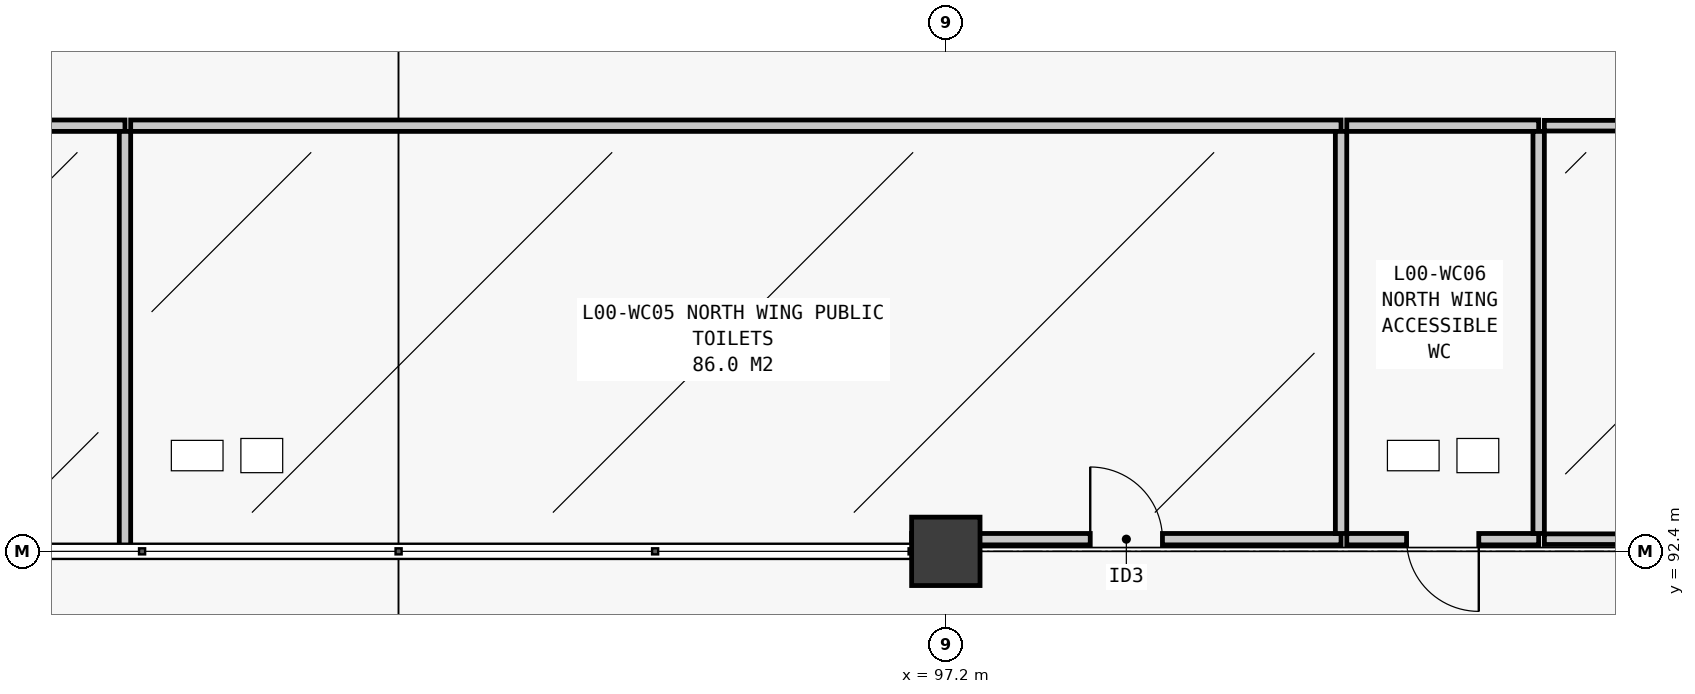
"""IFC4 building model, lengths in metres.
Left out: names, types, materials, properties, quantities, classifications, styles, units other than length and angle.
Written with IfcOpenShell. Run it as: python <this file> out.ifc"""

import sys

from ifc_helpers import new_model, si_unit, direction, frame, frame_2d, origin, origin_2d, place, context, subcontext, project, spatial, rectangle, extrude, element, fill, save


model = new_model("IFC4")
c1 = context("Model", 3, precision=1e-05, world=origin(), true_north=direction((0.0, 1.0)))
c2 = subcontext(c1, "Body", "Model", "MODEL_VIEW")
j1 = project(units=[si_unit("LENGTHUNIT", "METRE"), si_unit("PLANEANGLEUNIT", "RADIAN")], contexts=[c1])
p1 = place(None, origin())
s1 = spatial("IfcSite", under=j1, at=p1, CompositionType="ELEMENT")
p2 = place(p1, origin())
s2 = spatial("IfcBuilding", under=s1, at=p2, CompositionType="ELEMENT")
p3 = place(p2, origin())
s3 = spatial("IfcBuildingStorey", under=s2, at=p3, CompositionType="ELEMENT", Elevation=0.0)
p4 = place(p3, frame((97.2, 92.4, 0.0), z_axis=(0.0, 0.0, 1.0), x_axis=(1.0, 0.0, 0.0)))
e1 = element("IfcColumn", 1, at=p4, inside=s3, PredefinedType="COLUMN", context=c2, shape_type="SweptSolid", body=[
    extrude(rectangle(XDim=0.9, YDim=0.9, at=origin_2d()), origin(), (0.0, 0.0, 1.0), 4.8),
])
p5 = place(p3, frame((51.4, 98.0, 0.0), z_axis=(0.0, 0.0, 1.0), x_axis=(1.0, 0.0, 0.0)))
e2 = element("IfcWall", 2, at=p5, inside=s3, PredefinedType="PLUMBINGWALL", context=c2, shape_type="SweptSolid", body=[
    extrude(rectangle(XDim=35.0, YDim=0.15, at=frame_2d((17.5, 0.0))), origin(), (0.0, 0.0, 1.0), 4.52),
])
p6 = place(p3, frame((86.4, 92.42, 0.0), z_axis=(0.0, 0.0, 1.0), x_axis=(0.0, 1.0, 0.0)))
e3 = element("IfcWall", 3, at=p6, inside=s3, PredefinedType="PLUMBINGWALL", context=c2, shape_type="SweptSolid", body=[
    extrude(rectangle(XDim=5.505, YDim=0.15, at=frame_2d((2.752, 0.0))), origin(), (0.0, 0.0, 1.0), 4.216),
])
p7 = place(p3, frame((96.75, 92.56, 0.0), z_axis=(0.0, 0.0, 1.0), x_axis=(1.0, 0.0, 0.0)))
e4 = element("IfcWall", 4, at=p7, inside=s3, PredefinedType="PLUMBINGWALL", context=c2, shape_type="SweptSolid", body=[
    extrude(rectangle(XDim=5.65, YDim=0.15, at=frame_2d((2.825, 0.0))), origin(), (0.0, 0.0, 1.0), 3.606),
])
p8 = place(p7, frame((2.35, 0.0, 0.0)))
e5 = element("IfcOpeningElement", 5, at=p8, cuts=e4, PredefinedType="OPENING", context=c2, shape_type="SweptSolid", body=[
    extrude(rectangle(XDim=0.95, YDim=2.1, at=frame_2d((0.475, 1.05))), frame((0.0, 0.09, 0.0), z_axis=(0.0, -1.0, 0.0), x_axis=(1.0, 0.0, 0.0)), (0.0, 0.0, 1.0), 0.18),
])
p9 = place(p3, frame((86.475, 98.0, 0.0), z_axis=(0.0, 0.0, 1.0), x_axis=(1.0, 0.0, 0.0)))
e6 = element("IfcWall", 6, at=p9, inside=s3, PredefinedType="PLUMBINGWALL", context=c2, shape_type="SweptSolid", body=[
    extrude(rectangle(XDim=15.925, YDim=0.15, at=frame_2d((7.962, 0.0))), origin(), (0.0, 0.0, 1.0), 4.52),
])
p10 = place(p3, frame((102.4, 92.635, 0.0), z_axis=(0.0, 0.0, 1.0), x_axis=(0.0, 1.0, 0.0)))
e7 = element("IfcWall", 7, at=p10, inside=s3, PredefinedType="PLUMBINGWALL", context=c2, shape_type="SweptSolid", body=[
    extrude(rectangle(XDim=5.29, YDim=0.15, at=frame_2d((2.645, 0.0))), origin(), (0.0, 0.0, 1.0), 4.52),
])
p11 = place(p3, frame((102.475, 92.56, 0.0), z_axis=(0.0, 0.0, 1.0), x_axis=(1.0, 0.0, 0.0)))
e8 = element("IfcWall", 8, at=p11, inside=s3, PredefinedType="PLUMBINGWALL", context=c2, shape_type="SweptSolid", body=[
    extrude(rectangle(XDim=2.525, YDim=0.15, at=frame_2d((1.262, 0.0))), origin(), (0.0, 0.0, 1.0), 3.606),
])
p12 = place(p11, frame((0.787, 0.0, 0.0)))
e9 = element("IfcOpeningElement", 9, at=p12, cuts=e8, PredefinedType="OPENING", context=c2, shape_type="SweptSolid", body=[
    extrude(rectangle(XDim=0.95, YDim=2.1, at=frame_2d((0.475, 1.05))), frame((0.0, 0.09, 0.0), z_axis=(0.0, -1.0, 0.0), x_axis=(1.0, 0.0, 0.0)), (0.0, 0.0, 1.0), 0.18),
])
p13 = place(p3, frame((102.475, 98.0, 0.0), z_axis=(0.0, 0.0, 1.0), x_axis=(1.0, 0.0, 0.0)))
e10 = element("IfcWall", 10, at=p13, inside=s3, PredefinedType="PLUMBINGWALL", context=c2, shape_type="SweptSolid", body=[
    extrude(rectangle(XDim=2.525, YDim=0.15, at=frame_2d((1.262, 0.0))), origin(), (0.0, 0.0, 1.0), 4.52),
])
p14 = place(p3, frame((105.0, 92.635, 0.0), z_axis=(0.0, 0.0, 1.0), x_axis=(0.0, 1.0, 0.0)))
e11 = element("IfcWall", 11, at=p14, inside=s3, PredefinedType="PLUMBINGWALL", context=c2, shape_type="SweptSolid", body=[
    extrude(rectangle(XDim=5.29, YDim=0.15, at=frame_2d((2.645, 0.0))), origin(), (0.0, 0.0, 1.0), 4.52),
])
p15 = place(p3, frame((105.075, 92.56, 0.0), z_axis=(0.0, 0.0, 1.0), x_axis=(1.0, 0.0, 0.0)))
e12 = element("IfcWall", 12, at=p15, inside=s3, PredefinedType="PARTITIONING", context=c2, shape_type="SweptSolid", body=[
    extrude(rectangle(XDim=20.765, YDim=0.14, at=frame_2d((10.383, 0.0))), origin(), (0.0, 0.0, 1.0), 3.606),
])
p16 = place(p15, frame((9.907, 0.0, 0.0)))
e13 = element("IfcOpeningElement", 13, at=p16, cuts=e12, PredefinedType="OPENING", context=c2, shape_type="SweptSolid", body=[
    extrude(rectangle(XDim=0.95, YDim=2.15, at=frame_2d((0.475, 1.075))), frame((0.0, 0.085, 0.0), z_axis=(0.0, -1.0, 0.0), x_axis=(1.0, 0.0, 0.0)), (0.0, 0.0, 1.0), 0.17),
])
p17 = place(p3, frame((105.075, 98.0, 0.0), z_axis=(0.0, 0.0, 1.0), x_axis=(1.0, 0.0, 0.0)))
e14 = element("IfcWall", 14, at=p17, inside=s3, PredefinedType="PARTITIONING", context=c2, shape_type="SweptSolid", body=[
    extrude(rectangle(XDim=20.765, YDim=0.14, at=frame_2d((10.383, 0.0))), origin(), (0.0, 0.0, 1.0), 4.52),
])
p18 = place(p8, origin())
e15 = element("IfcDoor", 15, at=p18, inside=s3, OperationType="SINGLE_SWING_LEFT", PredefinedType="DOOR", context=c2, shape_type="SweptSolid", body=[
    extrude(rectangle(XDim=0.95, YDim=2.1, at=frame_2d((0.475, 1.05))), frame((0.0, 0.025, 0.0), z_axis=(0.0, -1.0, 0.0), x_axis=(1.0, 0.0, 0.0)), (0.0, 0.0, 1.0), 0.05),
])
fill(e5, e15)
p19 = place(p12, frame((0.95, 0.0, 0.0), z_axis=(0.0, 0.0, 1.0), x_axis=(-1.0, 0.0, 0.0)))
e16 = element("IfcDoor", 16, at=p19, inside=s3, OperationType="SINGLE_SWING_RIGHT", PredefinedType="DOOR", context=c2, shape_type="SweptSolid", body=[
    extrude(rectangle(XDim=0.95, YDim=2.1, at=frame_2d((0.475, 1.05))), frame((0.0, 0.025, 0.0), z_axis=(0.0, -1.0, 0.0), x_axis=(1.0, 0.0, 0.0)), (0.0, 0.0, 1.0), 0.05),
])
fill(e9, e16)
save(model, sys.argv[1])
